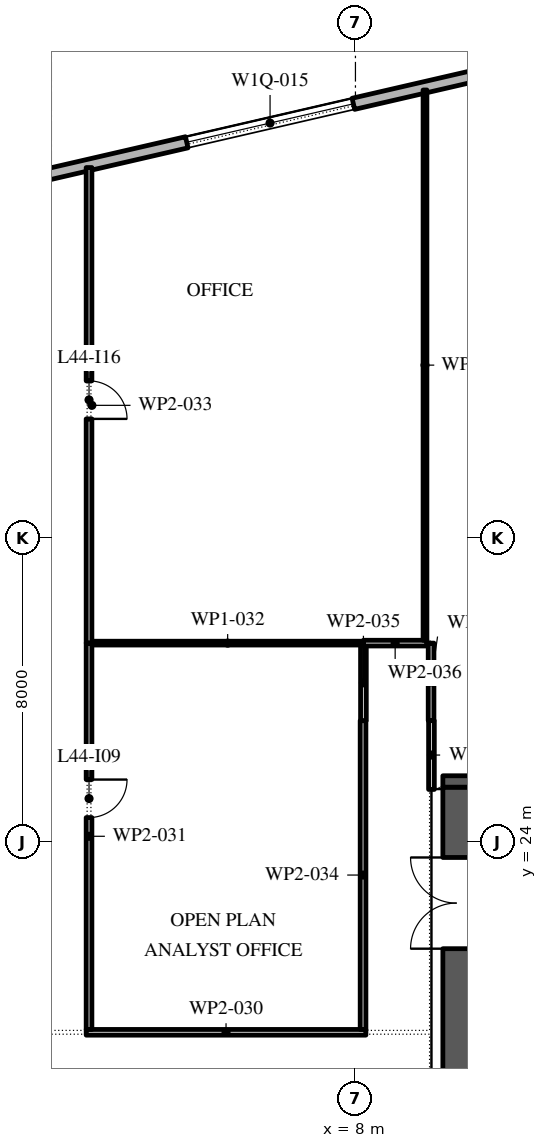
"""IFC4 building model, lengths in metres.
Left out: names, types, materials, properties, quantities, classifications, styles, units other than length and angle.
Written with IfcOpenShell. Run it as: python <this file> out.ifc"""

import sys

from ifc_helpers import new_model, si_unit, direction, frame, frame_2d, origin, place, context, subcontext, project, spatial, rectangle, extrude, element, fill, save


model = new_model("IFC4")
c1 = context("Model", 3, precision=1e-05, world=origin(), true_north=direction((0.0, 1.0)))
c2 = subcontext(c1, "Body", "Model", "MODEL_VIEW")
j1 = project(units=[si_unit("LENGTHUNIT", "METRE"), si_unit("PLANEANGLEUNIT", "RADIAN")], contexts=[c1])
p1 = place(None, origin())
s1 = spatial("IfcSite", under=j1, at=p1, CompositionType="ELEMENT")
p2 = place(p1, origin())
s2 = spatial("IfcBuilding", under=s1, at=p2, CompositionType="ELEMENT")
p3 = place(p2, frame((0.0, 0.0, 201.0)))
s3 = spatial("IfcBuildingStorey", under=s2, at=p3, CompositionType="ELEMENT", Elevation=201.0)
p4 = place(p3, frame((17.592, 45.657, 0.0), z_axis=(0.0, 0.0, 1.0), x_axis=(-0.974370243697, -0.224950279389, 0.0)))
e1 = element("IfcWall", 1, at=p4, inside=s3, PredefinedType="STANDARD", context=c2, shape_type="SweptSolid", body=[
    extrude(rectangle(XDim=49.5, YDim=0.3, at=frame_2d((24.75, 0.0))), origin(), (0.0, 0.0, 1.0), 4.0),
])
p5 = place(p4, frame((2.8, 0.0, 0.0)))
e2 = element("IfcOpeningElement", 2, at=p5, cuts=e1, PredefinedType="OPENING", context=c2, shape_type="SweptSolid", body=[
    extrude(rectangle(XDim=2.4, YDim=3.5, at=frame_2d((1.2, 1.75))), frame((0.0, 0.16, 0.0), z_axis=(0.0, -1.0, 0.0), x_axis=(1.0, 0.0, 0.0)), (0.0, 0.0, 1.0), 0.32),
])
p6 = place(p4, frame((9.9, 0.0, 0.45)))
e3 = element("IfcOpeningElement", 3, at=p6, cuts=e1, PredefinedType="OPENING", context=c2, shape_type="SweptSolid", body=[
    extrude(rectangle(XDim=4.5, YDim=2.45, at=frame_2d((2.25, 1.225))), frame((0.0, 0.16, 0.0), z_axis=(0.0, -1.0, 0.0), x_axis=(1.0, 0.0, 0.0)), (0.0, 0.0, 1.0), 0.32),
])
p7 = place(p4, frame((18.2, 0.0, 0.45)))
e4 = element("IfcOpeningElement", 4, at=p7, cuts=e1, PredefinedType="OPENING", context=c2, shape_type="SweptSolid", body=[
    extrude(rectangle(XDim=4.5, YDim=2.45, at=frame_2d((2.25, 1.225))), frame((0.0, 0.16, 0.0), z_axis=(0.0, -1.0, 0.0), x_axis=(1.0, 0.0, 0.0)), (0.0, 0.0, 1.0), 0.32),
])
p8 = place(p4, frame((26.5, 0.0, 0.45)))
e5 = element("IfcOpeningElement", 5, at=p8, cuts=e1, PredefinedType="OPENING", context=c2, shape_type="SweptSolid", body=[
    extrude(rectangle(XDim=4.5, YDim=2.5, at=frame_2d((2.25, 1.25))), frame((0.0, 0.16, 0.0), z_axis=(0.0, -1.0, 0.0), x_axis=(1.0, 0.0, 0.0)), (0.0, 0.0, 1.0), 0.32),
])
p9 = place(p4, frame((35.85, 0.0, 0.0)))
e6 = element("IfcOpeningElement", 6, at=p9, cuts=e1, PredefinedType="OPENING", context=c2, shape_type="SweptSolid", body=[
    extrude(rectangle(XDim=2.4, YDim=3.5, at=frame_2d((1.2, 1.75))), frame((0.0, 0.16, 0.0), z_axis=(0.0, -1.0, 0.0), x_axis=(1.0, 0.0, 0.0)), (0.0, 0.0, 1.0), 0.32),
])
p10 = place(p4, frame((43.1, 0.0, 0.45)))
e7 = element("IfcOpeningElement", 7, at=p10, cuts=e1, PredefinedType="OPENING", context=c2, shape_type="SweptSolid", body=[
    extrude(rectangle(XDim=4.5, YDim=2.675, at=frame_2d((2.25, 1.337))), frame((0.0, 0.16, 0.0), z_axis=(0.0, -1.0, 0.0), x_axis=(1.0, 0.0, 0.0)), (0.0, 0.0, 1.0), 0.32),
])
p11 = place(p3, frame((10.65, -2.45, 0.0), z_axis=(0.0, 0.0, 1.0), x_axis=(0.0, 1.0, 0.0)))
e8 = element("IfcWall", 8, at=p11, inside=s3, PredefinedType="SHEAR", context=c2, shape_type="SweptSolid", body=[
    extrude(rectangle(XDim=27.9, YDim=0.7, at=frame_2d((13.95, 0.0))), origin(), (0.0, 0.0, 1.0), 4.0),
])
p12 = place(p11, frame((23.65, 0.0, 0.0)))
e9 = element("IfcOpeningElement", 9, at=p12, cuts=e8, PredefinedType="OPENING", context=c2, shape_type="SweptSolid", body=[
    extrude(rectangle(XDim=2.4, YDim=2.1, at=frame_2d((1.2, 1.05))), frame((0.0, 0.36, 0.0), z_axis=(0.0, -1.0, 0.0), x_axis=(1.0, 0.0, 0.0)), (0.0, 0.0, 1.0), 0.72),
])
p13 = place(p11, frame((0.788, 0.0, 0.0)))
e10 = element("IfcOpeningElement", 10, at=p13, cuts=e8, PredefinedType="OPENING", context=c2, shape_type="SweptSolid", body=[
    extrude(rectangle(XDim=0.9, YDim=2.1, at=frame_2d((0.45, 1.05))), frame((0.0, 0.36, 0.0), z_axis=(0.0, -1.0, 0.0), x_axis=(1.0, 0.0, 0.0)), (0.0, 0.0, 1.0), 0.72),
])
p14 = place(p11, frame((3.962, 0.0, 0.0)))
e11 = element("IfcOpeningElement", 11, at=p14, cuts=e8, PredefinedType="OPENING", context=c2, shape_type="SweptSolid", body=[
    extrude(rectangle(XDim=1.0, YDim=2.1, at=frame_2d((0.5, 1.05))), frame((0.0, 0.36, 0.0), z_axis=(0.0, -1.0, 0.0), x_axis=(1.0, 0.0, 0.0)), (0.0, 0.0, 1.0), 0.72),
])
p15 = place(p3, frame((10.3, 25.6, 0.0), z_axis=(0.0, 0.0, 1.0), x_axis=(1.0, 0.0, 0.0)))
e12 = element("IfcWall", 12, at=p15, inside=s3, PredefinedType="SHEAR", context=c2, shape_type="SweptSolid", body=[
    extrude(rectangle(XDim=11.4, YDim=0.3, at=frame_2d((5.7, 0.0))), origin(), (0.0, 0.0, 1.0), 4.0),
])
p16 = place(p3, frame((0.915, 19.0, 0.0), z_axis=(0.0, 0.0, 1.0), x_axis=(1.0, 0.0, 0.0)))
e13 = element("IfcWall", 13, at=p16, inside=s3, PredefinedType="PARTITIONING", context=c2, shape_type="SweptSolid", body=[
    extrude(rectangle(XDim=7.36, YDim=0.15, at=frame_2d((3.68, 0.0))), origin(), (0.0, 0.0, 1.0), 4.0),
])
p17 = place(p3, frame((0.99, 29.24, 0.0), z_axis=(0.0, 0.0, 1.0), x_axis=(0.0, -1.0, 0.0)))
e14 = element("IfcWall", 14, at=p17, inside=s3, PredefinedType="PARTITIONING", context=c2, shape_type="SweptSolid", body=[
    extrude(rectangle(XDim=10.165, YDim=0.15, at=frame_2d((5.083, 0.0))), origin(), (0.0, 0.0, 1.0), 4.0),
])
p18 = place(p17, frame((3.59, 0.0, 0.0)))
e15 = element("IfcOpeningElement", 15, at=p18, cuts=e14, PredefinedType="OPENING", context=c2, shape_type="SweptSolid", body=[
    extrude(rectangle(XDim=1.0, YDim=2.1, at=frame_2d((0.5, 1.05))), frame((0.0, 0.085, 0.0), z_axis=(0.0, -1.0, 0.0), x_axis=(1.0, 0.0, 0.0)), (0.0, 0.0, 1.0), 0.17),
])
p19 = place(p3, frame((1.065, 29.24, 0.0), z_axis=(0.0, 0.0, 1.0), x_axis=(1.0, 0.0, 0.0)))
e16 = element("IfcWall", 16, at=p19, inside=s3, PredefinedType="PARTITIONING", context=c2, shape_type="SweptSolid", body=[
    extrude(rectangle(XDim=7.145, YDim=0.1, at=frame_2d((3.573, 0.0))), origin(), (0.0, 0.0, 1.0), 4.0),
])
p20 = place(p3, frame((0.99, 41.753, 0.0), z_axis=(0.0, 0.0, 1.0), x_axis=(0.0, -1.0, 0.0)))
e17 = element("IfcWall", 17, at=p20, inside=s3, PredefinedType="PARTITIONING", context=c2, shape_type="SweptSolid", body=[
    extrude(rectangle(XDim=12.513, YDim=0.15, at=frame_2d((6.256, 0.0))), origin(), (0.0, 0.0, 1.0), 4.0),
])
p21 = place(p20, frame((5.613, 0.0, 0.0)))
e18 = element("IfcOpeningElement", 18, at=p21, cuts=e17, PredefinedType="OPENING", context=c2, shape_type="SweptSolid", body=[
    extrude(rectangle(XDim=1.0, YDim=2.1, at=frame_2d((0.5, 1.05))), frame((0.0, 0.085, 0.0), z_axis=(0.0, -1.0, 0.0), x_axis=(1.0, 0.0, 0.0)), (0.0, 0.0, 1.0), 0.17),
])
p22 = place(p3, frame((8.2, 19.075, 0.0), z_axis=(0.0, 0.0, 1.0), x_axis=(0.0, 1.0, 0.0)))
e19 = element("IfcWall", 19, at=p22, inside=s3, PredefinedType="PARTITIONING", context=c2, shape_type="SweptSolid", body=[
    extrude(rectangle(XDim=8.125, YDim=0.15, at=frame_2d((4.062, 0.0))), origin(), (0.0, 0.0, 1.0), 4.0),
])
p23 = place(p3, frame((8.21, 27.2, 0.0), z_axis=(0.0, 0.0, 1.0), x_axis=(0.0, 1.0, 0.0)))
e20 = element("IfcWall", 20, at=p23, inside=s3, PredefinedType="PARTITIONING", context=c2, shape_type="SweptSolid", body=[
    extrude(rectangle(XDim=1.99, YDim=0.15, at=frame_2d((0.995, 0.0))), origin(), (0.0, 0.0, 1.0), 4.0),
])
p24 = place(p3, frame((8.21, 29.24, 0.0), z_axis=(0.0, 0.0, 1.0), x_axis=(1.0, 0.0, 0.0)))
e21 = element("IfcWall", 21, at=p24, inside=s3, PredefinedType="PARTITIONING", context=c2, shape_type="SweptSolid", body=[
    extrude(rectangle(XDim=1.67, YDim=0.15, at=frame_2d((0.835, 0.0))), origin(), (0.0, 0.0, 1.0), 4.0),
])
p25 = place(p3, frame((9.83, 43.794, 0.0), z_axis=(0.0, 0.0, 1.0), x_axis=(0.0, -1.0, 0.0)))
e22 = element("IfcWall", 22, at=p25, inside=s3, PredefinedType="PARTITIONING", context=c2, shape_type="SweptSolid", body=[
    extrude(rectangle(XDim=14.479, YDim=0.1, at=frame_2d((7.24, 0.0))), origin(), (0.0, 0.0, 1.0), 3.02),
])
p26 = place(p3, frame((9.99, 29.24, 0.0), z_axis=(0.0, 0.0, 1.0), x_axis=(0.0, -1.0, 0.0)))
e23 = element("IfcWall", 23, at=p26, inside=s3, PredefinedType="PARTITIONING", context=c2, shape_type="SweptSolid", body=[
    extrude(rectangle(XDim=2.04, YDim=0.15, at=frame_2d((1.02, 0.0))), origin(), (0.0, 0.0, 1.0), 3.02),
])
p27 = place(p3, frame((10.0, 27.2, 0.0), z_axis=(0.0, 0.0, 1.0), x_axis=(0.0, -1.0, 0.0)))
e24 = element("IfcWall", 24, at=p27, inside=s3, PredefinedType="PARTITIONING", context=c2, shape_type="SweptSolid", body=[
    extrude(rectangle(XDim=1.81, YDim=0.15, at=frame_2d((0.905, 0.0))), origin(), (0.0, 0.0, 1.0), 3.02),
])
p28 = place(p6, origin())
e25 = element("IfcWindow", 25, at=p28, inside=s3, PartitioningType="DOUBLE_PANEL_VERTICAL", PredefinedType="WINDOW", context=c2, shape_type="SweptSolid", body=[
    extrude(rectangle(XDim=4.5, YDim=2.45, at=frame_2d((2.25, 1.225))), frame((0.0, 0.03, 0.0), z_axis=(0.0, -1.0, 0.0), x_axis=(1.0, 0.0, 0.0)), (0.0, 0.0, 1.0), 0.06),
])
fill(e3, e25)
p29 = place(p12, origin())
e26 = element("IfcDoor", 26, at=p29, inside=s3, OperationType="DOUBLE_DOOR_SINGLE_SWING", PredefinedType="DOOR", context=c2, shape_type="SweptSolid", body=[
    extrude(rectangle(XDim=2.4, YDim=2.1, at=frame_2d((1.2, 1.05))), frame((0.0, 0.025, 0.0), z_axis=(0.0, -1.0, 0.0), x_axis=(1.0, 0.0, 0.0)), (0.0, 0.0, 1.0), 0.05),
])
fill(e9, e26)
p30 = place(p18, origin())
e27 = element("IfcDoor", 27, at=p30, inside=s3, OperationType="SINGLE_SWING_RIGHT", PredefinedType="DOOR", context=c2, shape_type="SweptSolid", body=[
    extrude(rectangle(XDim=1.0, YDim=2.1, at=frame_2d((0.5, 1.05))), frame((0.0, 0.025, 0.0), z_axis=(0.0, -1.0, 0.0), x_axis=(1.0, 0.0, 0.0)), (0.0, 0.0, 1.0), 0.05),
])
fill(e15, e27)
p31 = place(p21, origin())
e28 = element("IfcDoor", 28, at=p31, inside=s3, OperationType="SINGLE_SWING_LEFT", PredefinedType="DOOR", context=c2, shape_type="SweptSolid", body=[
    extrude(rectangle(XDim=1.0, YDim=2.1, at=frame_2d((0.5, 1.05))), frame((0.0, 0.025, 0.0), z_axis=(0.0, -1.0, 0.0), x_axis=(1.0, 0.0, 0.0)), (0.0, 0.0, 1.0), 0.05),
])
fill(e18, e28)
save(model, sys.argv[1])
